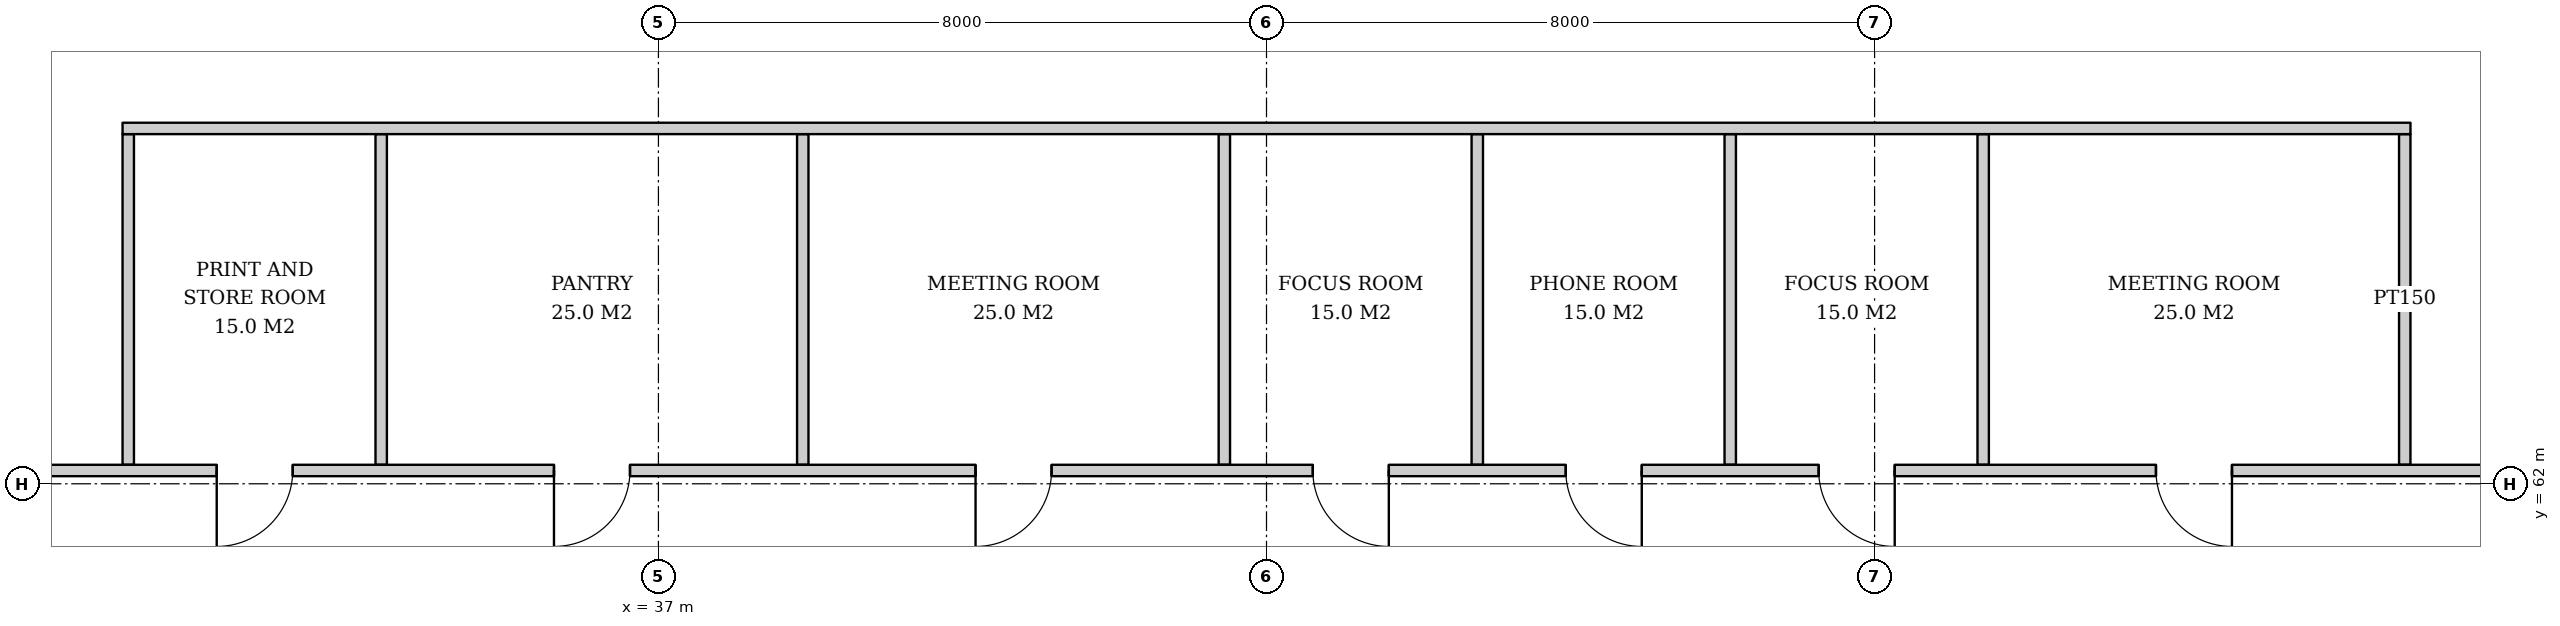
"""IFC4 building model, lengths in metres.
Left out: names, types, materials, properties, quantities, classifications, styles, units other than length and angle.
Written with IfcOpenShell. Run it as: python <this file> out.ifc"""

import sys

from ifc_helpers import new_model, si_unit, direction, frame, frame_2d, origin, place, context, subcontext, project, spatial, rectangle, extrude, element, fill, save


model = new_model("IFC4")
c1 = context("Model", 3, precision=1e-05, world=origin(), true_north=direction((0.0, 1.0)))
c2 = subcontext(c1, "Body", "Model", "MODEL_VIEW")
j1 = project(units=[si_unit("LENGTHUNIT", "METRE"), si_unit("PLANEANGLEUNIT", "RADIAN")], contexts=[c1])
p1 = place(None, origin())
s1 = spatial("IfcSite", under=j1, at=p1, CompositionType="ELEMENT")
p2 = place(p1, origin())
s2 = spatial("IfcBuilding", under=s1, at=p2, CompositionType="ELEMENT")
p3 = place(p2, frame((0.0, 0.0, 47.6)))
s3 = spatial("IfcBuildingStorey", under=s2, at=p3, CompositionType="ELEMENT", Elevation=47.6)
for number, where, z_axis, x_axis in (
    (1, (59.975, 62.25, 0.0), (0.0, 0.0, 1.0), (0.0, 1.0, 0.0)),
    (2, (54.429, 62.25, 0.0), (0.0, 0.0, 1.0), (0.0, 1.0, 0.0)),
    (3, (51.101, 62.25, 0.0), (0.0, 0.0, 1.0), (0.0, 1.0, 0.0)),
    (4, (47.773, 62.25, 0.0), (0.0, 0.0, 1.0), (0.0, 1.0, 0.0)),
    (5, (44.445, 62.25, 0.0), (0.0, 0.0, 1.0), (0.0, 1.0, 0.0)),
    (6, (38.899, 62.25, 0.0), (0.0, 0.0, 1.0), (0.0, 1.0, 0.0)),
    (7, (33.353, 62.25, 0.0), (0.0, 0.0, 1.0), (0.0, 1.0, 0.0)),
):
    element("IfcWall", number, at=place(p3, frame(where, z_axis=z_axis, x_axis=x_axis)), inside=s3, PredefinedType="PARTITIONING", context=c2, shape_type="SweptSolid", body=[
        extrude(rectangle(XDim=4.35, YDim=0.15, at=frame_2d((2.175, 0.0))), origin(), (0.0, 0.0, 1.0), 3.62),
    ])
p4 = place(p3, frame((30.025, 62.25, 0.0), z_axis=(0.0, 0.0, 1.0), x_axis=(0.0, 1.0, 0.0)))
e8 = element("IfcWall", 8, at=p4, inside=s3, PredefinedType="PARTITIONING", context=c2, shape_type="SweptSolid", body=[
    extrude(rectangle(XDim=4.35, YDim=0.15, at=frame_2d((2.175, 0.0))), origin(), (0.0, 0.0, 1.0), 2.806),
])
p5 = place(p3, frame((60.05, 66.675, 0.0), z_axis=(0.0, 0.0, 1.0), x_axis=(-1.0, 0.0, 0.0)))
e9 = element("IfcWall", 9, at=p5, inside=s3, PredefinedType="PARTITIONING", context=c2, shape_type="SweptSolid", body=[
    extrude(rectangle(XDim=30.1, YDim=0.15, at=frame_2d((15.05, 0.0))), origin(), (0.0, 0.0, 1.0), 2.612),
])
p6 = place(p3, frame((61.25, 62.175, 0.0), z_axis=(0.0, 0.0, 1.0), x_axis=(-1.0, 0.0, 0.0)))
e10 = element("IfcWall", 10, at=p6, inside=s3, PredefinedType="PARTITIONING", context=c2, shape_type="SweptSolid", body=[
    extrude(rectangle(XDim=32.35, YDim=0.15, at=frame_2d((16.175, 0.0))), origin(), (0.0, 0.0, 1.0), 2.612),
])
p7 = place(p6, frame((3.548, 0.0, 0.0)))
e11 = element("IfcOpeningElement", 11, at=p7, cuts=e10, PredefinedType="OPENING", context=c2, shape_type="SweptSolid", body=[
    extrude(rectangle(XDim=1.0, YDim=2.1, at=frame_2d((0.5, 1.05))), frame((0.0, 0.085, 0.0), z_axis=(0.0, -1.0, 0.0), x_axis=(1.0, 0.0, 0.0)), (0.0, 0.0, 1.0), 0.17),
])
p8 = place(p6, frame((7.985, 0.0, 0.0)))
e12 = element("IfcOpeningElement", 12, at=p8, cuts=e10, PredefinedType="OPENING", context=c2, shape_type="SweptSolid", body=[
    extrude(rectangle(XDim=1.0, YDim=2.1, at=frame_2d((0.5, 1.05))), frame((0.0, 0.085, 0.0), z_axis=(0.0, -1.0, 0.0), x_axis=(1.0, 0.0, 0.0)), (0.0, 0.0, 1.0), 0.17),
])
p9 = place(p6, frame((11.313, 0.0, 0.0)))
e13 = element("IfcOpeningElement", 13, at=p9, cuts=e10, PredefinedType="OPENING", context=c2, shape_type="SweptSolid", body=[
    extrude(rectangle(XDim=1.0, YDim=2.1, at=frame_2d((0.5, 1.05))), frame((0.0, 0.085, 0.0), z_axis=(0.0, -1.0, 0.0), x_axis=(1.0, 0.0, 0.0)), (0.0, 0.0, 1.0), 0.17),
])
p10 = place(p6, frame((14.641, 0.0, 0.0)))
e14 = element("IfcOpeningElement", 14, at=p10, cuts=e10, PredefinedType="OPENING", context=c2, shape_type="SweptSolid", body=[
    extrude(rectangle(XDim=1.0, YDim=2.1, at=frame_2d((0.5, 1.05))), frame((0.0, 0.085, 0.0), z_axis=(0.0, -1.0, 0.0), x_axis=(1.0, 0.0, 0.0)), (0.0, 0.0, 1.0), 0.17),
])
p11 = place(p6, frame((19.078, 0.0, 0.0)))
e15 = element("IfcOpeningElement", 15, at=p11, cuts=e10, PredefinedType="OPENING", context=c2, shape_type="SweptSolid", body=[
    extrude(rectangle(XDim=1.0, YDim=2.1, at=frame_2d((0.5, 1.05))), frame((0.0, 0.085, 0.0), z_axis=(0.0, -1.0, 0.0), x_axis=(1.0, 0.0, 0.0)), (0.0, 0.0, 1.0), 0.17),
])
p12 = place(p6, frame((24.624, 0.0, 0.0)))
e16 = element("IfcOpeningElement", 16, at=p12, cuts=e10, PredefinedType="OPENING", context=c2, shape_type="SweptSolid", body=[
    extrude(rectangle(XDim=1.0, YDim=2.1, at=frame_2d((0.5, 1.05))), frame((0.0, 0.085, 0.0), z_axis=(0.0, -1.0, 0.0), x_axis=(1.0, 0.0, 0.0)), (0.0, 0.0, 1.0), 0.17),
])
p13 = place(p6, frame((29.061, 0.0, 0.0)))
e17 = element("IfcOpeningElement", 17, at=p13, cuts=e10, PredefinedType="OPENING", context=c2, shape_type="SweptSolid", body=[
    extrude(rectangle(XDim=1.0, YDim=2.1, at=frame_2d((0.5, 1.05))), frame((0.0, 0.085, 0.0), z_axis=(0.0, -1.0, 0.0), x_axis=(1.0, 0.0, 0.0)), (0.0, 0.0, 1.0), 0.17),
])
p14 = place(p7, origin())
e18 = element("IfcDoor", 18, at=p14, inside=s3, OperationType="SINGLE_SWING_LEFT", PredefinedType="DOOR", context=c2, shape_type="SweptSolid", body=[
    extrude(rectangle(XDim=1.0, YDim=2.1, at=frame_2d((0.5, 1.05))), frame((0.0, 0.025, 0.0), z_axis=(0.0, -1.0, 0.0), x_axis=(1.0, 0.0, 0.0)), (0.0, 0.0, 1.0), 0.05),
])
fill(e11, e18)
p15 = place(p8, origin())
e19 = element("IfcDoor", 19, at=p15, inside=s3, OperationType="SINGLE_SWING_LEFT", PredefinedType="DOOR", context=c2, shape_type="SweptSolid", body=[
    extrude(rectangle(XDim=1.0, YDim=2.1, at=frame_2d((0.5, 1.05))), frame((0.0, 0.025, 0.0), z_axis=(0.0, -1.0, 0.0), x_axis=(1.0, 0.0, 0.0)), (0.0, 0.0, 1.0), 0.05),
])
fill(e12, e19)
p16 = place(p9, origin())
e20 = element("IfcDoor", 20, at=p16, inside=s3, OperationType="SINGLE_SWING_LEFT", PredefinedType="DOOR", context=c2, shape_type="SweptSolid", body=[
    extrude(rectangle(XDim=1.0, YDim=2.1, at=frame_2d((0.5, 1.05))), frame((0.0, 0.025, 0.0), z_axis=(0.0, -1.0, 0.0), x_axis=(1.0, 0.0, 0.0)), (0.0, 0.0, 1.0), 0.05),
])
fill(e13, e20)
p17 = place(p10, origin())
e21 = element("IfcDoor", 21, at=p17, inside=s3, OperationType="SINGLE_SWING_LEFT", PredefinedType="DOOR", context=c2, shape_type="SweptSolid", body=[
    extrude(rectangle(XDim=1.0, YDim=2.1, at=frame_2d((0.5, 1.05))), frame((0.0, 0.025, 0.0), z_axis=(0.0, -1.0, 0.0), x_axis=(1.0, 0.0, 0.0)), (0.0, 0.0, 1.0), 0.05),
])
fill(e14, e21)
p18 = place(p11, origin())
e22 = element("IfcDoor", 22, at=p18, inside=s3, OperationType="SINGLE_SWING_RIGHT", PredefinedType="DOOR", context=c2, shape_type="SweptSolid", body=[
    extrude(rectangle(XDim=1.0, YDim=2.1, at=frame_2d((0.5, 1.05))), frame((0.0, 0.025, 0.0), z_axis=(0.0, -1.0, 0.0), x_axis=(1.0, 0.0, 0.0)), (0.0, 0.0, 1.0), 0.05),
])
fill(e15, e22)
p19 = place(p12, origin())
e23 = element("IfcDoor", 23, at=p19, inside=s3, OperationType="SINGLE_SWING_RIGHT", PredefinedType="DOOR", context=c2, shape_type="SweptSolid", body=[
    extrude(rectangle(XDim=1.0, YDim=2.1, at=frame_2d((0.5, 1.05))), frame((0.0, 0.025, 0.0), z_axis=(0.0, -1.0, 0.0), x_axis=(1.0, 0.0, 0.0)), (0.0, 0.0, 1.0), 0.05),
])
fill(e16, e23)
p20 = place(p13, origin())
e24 = element("IfcDoor", 24, at=p20, inside=s3, OperationType="SINGLE_SWING_RIGHT", PredefinedType="DOOR", context=c2, shape_type="SweptSolid", body=[
    extrude(rectangle(XDim=1.0, YDim=2.1, at=frame_2d((0.5, 1.05))), frame((0.0, 0.025, 0.0), z_axis=(0.0, -1.0, 0.0), x_axis=(1.0, 0.0, 0.0)), (0.0, 0.0, 1.0), 0.05),
])
fill(e17, e24)
save(model, sys.argv[1])
